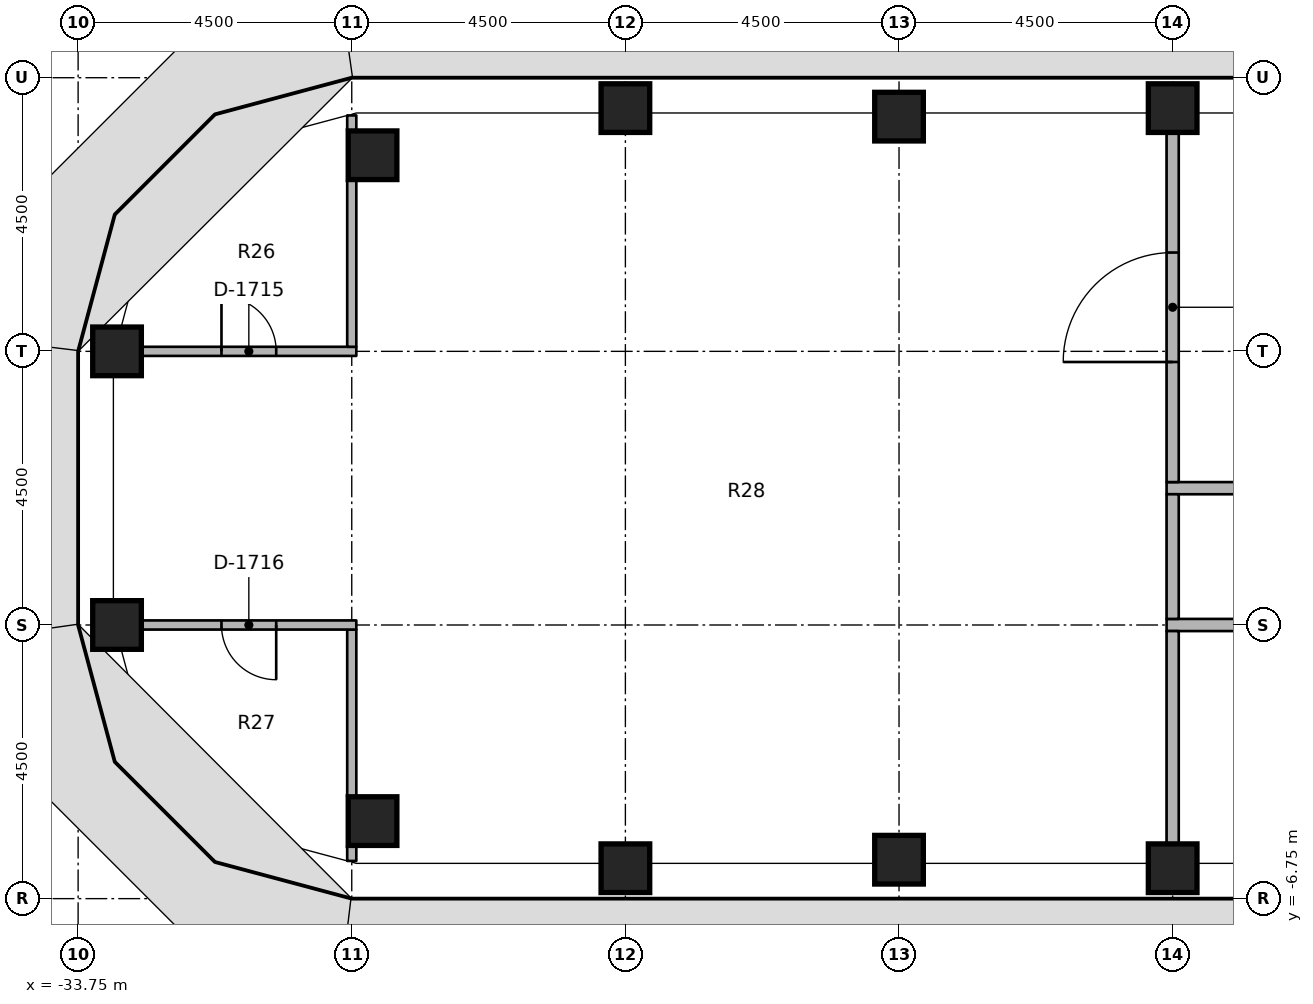
"""IFC4 building model, lengths in metres.
Left out: names, types, materials, properties, quantities, classifications, styles, units other than length and angle.
Written with IfcOpenShell. Run it as: python <this file> out.ifc"""

import sys

from ifc_helpers import new_model, si_unit, direction, frame, frame_2d, origin, origin_2d, place, context, subcontext, project, spatial, rectangle, extrude, element, fill, save


model = new_model("IFC4")
c1 = context("Model", 3, precision=1e-05, world=origin(), true_north=direction((0.0, 1.0)))
c2 = subcontext(c1, "Body", "Model", "MODEL_VIEW")
j1 = project(units=[si_unit("LENGTHUNIT", "METRE"), si_unit("PLANEANGLEUNIT", "RADIAN")], contexts=[c1])
p1 = place(None, origin())
s1 = spatial("IfcSite", under=j1, at=p1, CompositionType="ELEMENT")
p2 = place(p1, origin())
s2 = spatial("IfcBuilding", under=s1, at=p2, CompositionType="ELEMENT")
p3 = place(p2, frame((0.0, 0.0, 160.0)))
s3 = spatial("IfcBuildingStorey", under=s2, at=p3, CompositionType="ELEMENT", Elevation=160.0)
for number, where, z_axis, x_axis in (
    (1, (-33.11, -2.25, 0.0), (0.0, 0.0, 1.0), (1.0, 0.0, 0.0)),
    (2, (-33.11, 2.25, 0.0), (0.0, 0.0, 1.0), (1.0, 0.0, 0.0)),
    (3, (-28.908, -5.475, 0.0), (0.0, 0.0, 1.0), (1.0, 0.0, 0.0)),
    (4, (-28.908, 5.475, 0.0), (0.0, 0.0, 1.0), (1.0, 0.0, 0.0)),
    (5, (-24.75, -6.25, 0.0), (0.0, 0.0, 1.0), (1.0, 0.0, 0.0)),
    (6, (-24.75, 6.25, 0.0), (0.0, 0.0, 1.0), (1.0, 0.0, 0.0)),
    (7, (-20.25, -6.11, 0.0), (0.0, 0.0, 1.0), (1.0, 0.0, 0.0)),
    (8, (-20.25, 6.11, 0.0), (0.0, 0.0, 1.0), (1.0, 0.0, 0.0)),
    (9, (-15.75, -6.25, 0.0), (0.0, 0.0, 1.0), (1.0, 0.0, 0.0)),
    (10, (-15.75, 6.25, 0.0), (0.0, 0.0, 1.0), (1.0, 0.0, 0.0)),
):
    element("IfcColumn", number, at=place(p3, frame(where, z_axis=z_axis, x_axis=x_axis)), inside=s3, PredefinedType="COLUMN", context=c2, shape_type="SweptSolid", body=[
        extrude(rectangle(XDim=0.8, YDim=0.8, at=origin_2d()), origin(), (0.0, 0.0, 1.0), 3.65),
    ])
p4 = place(p3, frame((-15.85, 0.0, 0.0), z_axis=(0.0, 0.0, 1.0), x_axis=(1.0, 0.0, 0.0)))
e11 = element("IfcWall", 11, at=p4, inside=s3, PredefinedType="PARTITIONING", context=c2, shape_type="SweptSolid", body=[
    extrude(rectangle(XDim=4.7, YDim=0.2, at=frame_2d((2.35, 0.0))), origin(), (0.0, 0.0, 1.0), 2.75),
])
p5 = place(p4, frame((1.85, 0.0, 0.0)))
e12 = element("IfcOpeningElement", 12, at=p5, cuts=e11, PredefinedType="OPENING", context=c2, shape_type="SweptSolid", body=[
    extrude(rectangle(XDim=1.0, YDim=2.1, at=frame_2d((0.5, 1.05))), frame((0.0, 0.11, 0.0), z_axis=(0.0, -1.0, 0.0), x_axis=(1.0, 0.0, 0.0)), (0.0, 0.0, 1.0), 0.22),
])
p6 = place(p3, frame((-11.15, -2.25, 0.0), z_axis=(0.0, 0.0, 1.0), x_axis=(-1.0, 0.0, 0.0)))
e13 = element("IfcWall", 13, at=p6, inside=s3, PredefinedType="PARTITIONING", context=c2, shape_type="SweptSolid", body=[
    extrude(rectangle(XDim=4.7, YDim=0.2, at=frame_2d((2.35, 0.0))), origin(), (0.0, 0.0, 1.0), 2.75),
])
p7 = place(p6, frame((1.85, 0.0, 0.0)))
e14 = element("IfcOpeningElement", 14, at=p7, cuts=e13, PredefinedType="OPENING", context=c2, shape_type="SweptSolid", body=[
    extrude(rectangle(XDim=1.0, YDim=2.1, at=frame_2d((0.5, 1.05))), frame((0.0, 0.11, 0.0), z_axis=(0.0, -1.0, 0.0), x_axis=(1.0, 0.0, 0.0)), (0.0, 0.0, 1.0), 0.22),
])
p8 = place(p3, frame((-15.75, -2.15, 0.0), z_axis=(0.0, 0.0, 1.0), x_axis=(0.0, 1.0, 0.0)))
e15 = element("IfcWall", 15, at=p8, inside=s3, PredefinedType="PARTITIONING", context=c2, shape_type="SweptSolid", body=[
    extrude(rectangle(XDim=2.05, YDim=0.2, at=frame_2d((1.025, 0.0))), origin(), (0.0, 0.0, 1.0), 2.75),
])
p9 = place(p3, frame((-15.75, 0.1, 0.0), z_axis=(0.0, 0.0, 1.0), x_axis=(0.0, 1.0, 0.0)))
e16 = element("IfcWall", 16, at=p9, inside=s3, PredefinedType="PARTITIONING", context=c2, shape_type="SweptSolid", body=[
    extrude(rectangle(XDim=5.75, YDim=0.2, at=frame_2d((2.875, 0.0))), origin(), (0.0, 0.0, 1.0), 2.75),
])
p10 = place(p9, frame((1.975, 0.0, 0.0)))
e17 = element("IfcOpeningElement", 17, at=p10, cuts=e16, PredefinedType="OPENING", context=c2, shape_type="SweptSolid", body=[
    extrude(rectangle(XDim=1.8, YDim=2.1, at=frame_2d((0.9, 1.05))), frame((0.0, 0.11, 0.0), z_axis=(0.0, -1.0, 0.0), x_axis=(1.0, 0.0, 0.0)), (0.0, 0.0, 1.0), 0.22),
])
p11 = place(p3, frame((-15.75, -5.85, 0.0), z_axis=(0.0, 0.0, 1.0), x_axis=(0.0, 1.0, 0.0)))
e18 = element("IfcWall", 18, at=p11, inside=s3, PredefinedType="PARTITIONING", context=c2, shape_type="SweptSolid", body=[
    extrude(rectangle(XDim=3.5, YDim=0.2, at=frame_2d((1.75, 0.0))), origin(), (0.0, 0.0, 1.0), 2.75),
])
p12 = place(p3, frame((-32.71, 2.25, 0.0), z_axis=(0.0, 0.0, 1.0), x_axis=(1.0, 0.0, 0.0)))
e19 = element("IfcWall", 19, at=p12, inside=s3, PredefinedType="PARTITIONING", context=c2, shape_type="SweptSolid", body=[
    extrude(rectangle(XDim=3.535, YDim=0.15, at=frame_2d((1.768, 0.0))), origin(), (0.0, 0.0, 1.0), 2.75),
])
p13 = place(p12, frame((1.317, 0.0, 0.0)))
e20 = element("IfcOpeningElement", 20, at=p13, cuts=e19, PredefinedType="OPENING", context=c2, shape_type="SweptSolid", body=[
    extrude(rectangle(XDim=0.9, YDim=2.1, at=frame_2d((0.45, 1.05))), frame((0.0, 0.085, 0.0), z_axis=(0.0, -1.0, 0.0), x_axis=(1.0, 0.0, 0.0)), (0.0, 0.0, 1.0), 0.17),
])
p14 = place(p3, frame((-29.25, 2.325, 0.0), z_axis=(0.0, 0.0, 1.0), x_axis=(0.0, 1.0, 0.0)))
e21 = element("IfcWall", 21, at=p14, inside=s3, PredefinedType="PARTITIONING", context=c2, shape_type="SweptSolid", body=[
    extrude(rectangle(XDim=2.75, YDim=0.15, at=frame_2d((1.375, 0.0))), origin(), (0.0, 0.0, 1.0), 2.75),
])
for number, where, z_axis, x_axis in (
    (22, (-29.25, 5.875, 0.0), (0.0, 0.0, 1.0), (0.0, 1.0, 0.0)),
    (23, (-29.25, -6.13, 0.0), (0.0, 0.0, 1.0), (0.0, 1.0, 0.0)),
):
    element("IfcWall", number, at=place(p3, frame(where, z_axis=z_axis, x_axis=x_axis)), inside=s3, PredefinedType="PARTITIONING", context=c2, shape_type="SweptSolid", body=[
        extrude(rectangle(XDim=0.255, YDim=0.15, at=frame_2d((0.127, 0.0))), origin(), (0.0, 0.0, 1.0), 2.75),
    ])
p15 = place(p3, frame((-29.25, -5.075, 0.0), z_axis=(0.0, 0.0, 1.0), x_axis=(0.0, 1.0, 0.0)))
e24 = element("IfcWall", 24, at=p15, inside=s3, PredefinedType="PARTITIONING", context=c2, shape_type="SweptSolid", body=[
    extrude(rectangle(XDim=2.75, YDim=0.15, at=frame_2d((1.375, 0.0))), origin(), (0.0, 0.0, 1.0), 2.75),
])
p16 = place(p3, frame((-29.175, -2.25, 0.0), z_axis=(0.0, 0.0, 1.0), x_axis=(-1.0, 0.0, 0.0)))
e25 = element("IfcWall", 25, at=p16, inside=s3, PredefinedType="PARTITIONING", context=c2, shape_type="SweptSolid", body=[
    extrude(rectangle(XDim=3.535, YDim=0.15, at=frame_2d((1.768, 0.0))), origin(), (0.0, 0.0, 1.0), 2.75),
])
p17 = place(p16, frame((1.317, 0.0, 0.0)))
e26 = element("IfcOpeningElement", 26, at=p17, cuts=e25, PredefinedType="OPENING", context=c2, shape_type="SweptSolid", body=[
    extrude(rectangle(XDim=0.9, YDim=2.1, at=frame_2d((0.45, 1.05))), frame((0.0, 0.085, 0.0), z_axis=(0.0, -1.0, 0.0), x_axis=(1.0, 0.0, 0.0)), (0.0, 0.0, 1.0), 0.17),
])
p18 = place(p13, origin())
e27 = element("IfcDoor", 27, at=p18, inside=s3, OperationType="SINGLE_SWING_LEFT", PredefinedType="DOOR", context=c2, shape_type="SweptSolid", body=[
    extrude(rectangle(XDim=0.9, YDim=2.1, at=frame_2d((0.45, 1.05))), frame((0.0, 0.025, 0.0), z_axis=(0.0, -1.0, 0.0), x_axis=(1.0, 0.0, 0.0)), (0.0, 0.0, 1.0), 0.05),
])
fill(e20, e27)
p19 = place(p17, origin())
e28 = element("IfcDoor", 28, at=p19, inside=s3, OperationType="SINGLE_SWING_RIGHT", PredefinedType="DOOR", context=c2, shape_type="SweptSolid", body=[
    extrude(rectangle(XDim=0.9, YDim=2.1, at=frame_2d((0.45, 1.05))), frame((0.0, 0.025, 0.0), z_axis=(0.0, -1.0, 0.0), x_axis=(1.0, 0.0, 0.0)), (0.0, 0.0, 1.0), 0.05),
])
fill(e26, e28)
p20 = place(p10, origin())
e29 = element("IfcDoor", 29, at=p20, inside=s3, OperationType="DOUBLE_DOOR_SINGLE_SWING", PredefinedType="DOOR", context=c2, shape_type="SweptSolid", body=[
    extrude(rectangle(XDim=1.8, YDim=2.1, at=frame_2d((0.9, 1.05))), frame((0.0, 0.025, 0.0), z_axis=(0.0, -1.0, 0.0), x_axis=(1.0, 0.0, 0.0)), (0.0, 0.0, 1.0), 0.05),
])
fill(e17, e29)
save(model, sys.argv[1])
